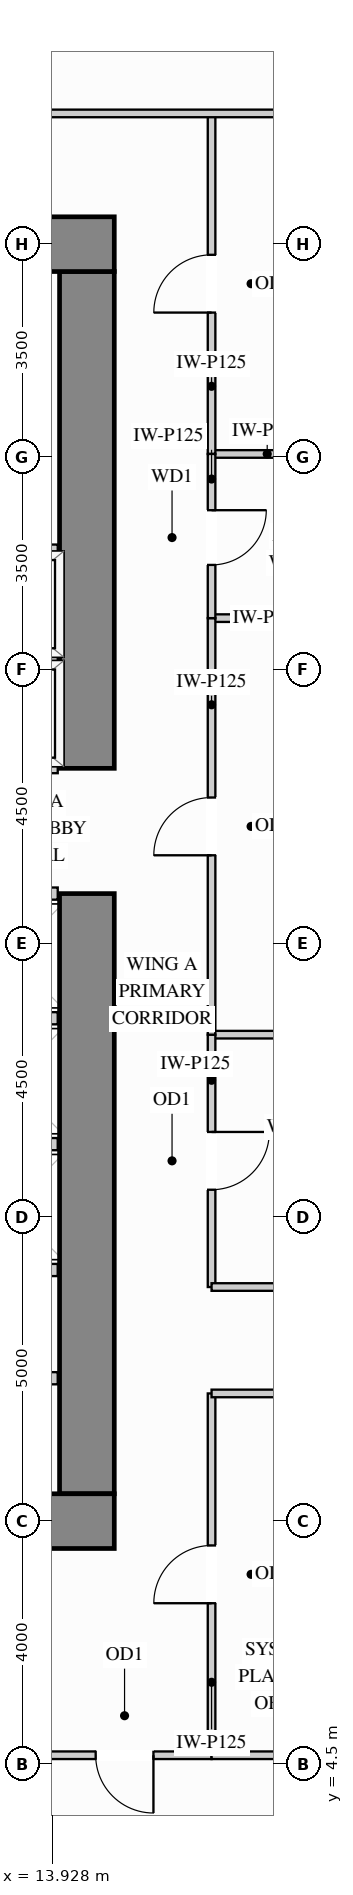
"""IFC4 building model, lengths in metres.
Left out: names, types, materials, properties, quantities, classifications, styles, units other than length and angle.
Written with IfcOpenShell. Run it as: python <this file> out.ifc"""

import sys

from ifc_helpers import new_model, si_unit, direction, frame, frame_2d, origin, place, context, subcontext, project, spatial, rectangle, extrude, source, transform, mapped, element, fill, save


model = new_model("IFC4")
c1 = context("Model", 3, precision=1e-05, world=origin(), true_north=direction((0.0, 1.0)))
c2 = subcontext(c1, "Body", "Model", "MODEL_VIEW")
j1 = project(units=[si_unit("LENGTHUNIT", "METRE"), si_unit("PLANEANGLEUNIT", "RADIAN")], contexts=[c1])
p1 = place(None, origin())
s1 = spatial("IfcSite", under=j1, at=p1, CompositionType="ELEMENT")
p2 = place(p1, origin())
s2 = spatial("IfcBuilding", under=s1, at=p2, CompositionType="ELEMENT")
p3 = place(p2, frame((0.0, 0.0, 44.1)))
s3 = spatial("IfcBuildingStorey", under=s2, at=p3, CompositionType="ELEMENT", Elevation=44.1)
m1 = source(origin(), c2, "Body", "SweptSolid", [
    extrude(rectangle(XDim=9.87, YDim=0.9, at=frame_2d((4.935, 0.0))), origin(), (0.0, 0.0, 1.0), 3.38),
])
p4 = place(p3, frame((14.5, 8.95, 0.0), z_axis=(0.0, 0.0, 1.0), x_axis=(0.0, 1.0, 0.0)))
e1 = element("IfcWall", 1, at=p4, inside=s3, PredefinedType="SHEAR", context=c2, shape_type="MappedRepresentation", body=[
    mapped(m1, transform((0.0, 0.0, 0.0), x_axis=(1.0, 0.0, 0.0), y_axis=(0.0, 1.0, 0.0), z_axis=(0.0, 0.0, 1.0))),
])
m2 = source(origin(), c2, "Body", "SweptSolid", [
    extrude(rectangle(XDim=8.17, YDim=0.9, at=frame_2d((4.085, 0.0))), origin(), (0.0, 0.0, 1.0), 3.38),
])
p5 = place(p3, frame((14.5, 20.88, 0.0), z_axis=(0.0, 0.0, 1.0), x_axis=(0.0, 1.0, 0.0)))
e2 = element("IfcWall", 2, at=p5, inside=s3, PredefinedType="SHEAR", context=c2, shape_type="MappedRepresentation", body=[
    mapped(m2, transform((0.0, 0.0, 0.0), x_axis=(1.0, 0.0, 0.0), y_axis=(0.0, 1.0, 0.0), z_axis=(0.0, 0.0, 1.0))),
])
m3 = source(origin(), c2, "Body", "SweptSolid", [
    extrude(rectangle(XDim=10.9, YDim=0.9, at=frame_2d((5.45, 0.0))), origin(), (0.0, 0.0, 1.0), 3.38),
])
for number, where, z_axis, x_axis in (
    (3, (4.05, 29.5, 0.0), (0.0, 0.0, 1.0), (1.0, 0.0, 0.0)),
    (4, (4.05, 8.5, 0.0), (0.0, 0.0, 1.0), (1.0, 0.0, 0.0)),
):
    element("IfcWall", number, at=place(p3, frame(where, z_axis=z_axis, x_axis=x_axis)), inside=s3, PredefinedType="SHEAR", context=c2, shape_type="MappedRepresentation", body=[
        mapped(m3, transform((0.0, 0.0, 0.0), x_axis=(1.0, 0.0, 0.0), y_axis=(0.0, 1.0, 0.0), z_axis=(0.0, 0.0, 1.0))),
    ])
m4 = source(origin(), c2, "Body", "SweptSolid", [
    extrude(rectangle(XDim=2.6, YDim=0.125, at=frame_2d((1.3, 0.0))), origin(), (0.0, 0.0, 1.0), 2.896),
])
p6 = place(p3, frame((16.55, 16.5, 0.0), z_axis=(0.0, 0.0, 1.0), x_axis=(1.0, 0.0, 0.0)))
e5 = element("IfcWall", 5, at=p6, inside=s3, PredefinedType="PARTITIONING", context=c2, shape_type="MappedRepresentation", body=[
    mapped(m4, transform((0.0, 0.0, 0.0), x_axis=(1.0, 0.0, 0.0), y_axis=(0.0, 1.0, 0.0), z_axis=(0.0, 0.0, 1.0))),
])
m5 = source(origin(), c2, "Body", "SweptSolid", [
    extrude(rectangle(XDim=2.598, YDim=0.125, at=frame_2d((1.299, 0.0))), origin(), (0.0, 0.0, 1.0), 3.365),
])
for number, where, z_axis, x_axis in (
    (6, (16.55, 23.35, 0.0), (0.0, 0.0, 1.0), (1.0, 0.0, 0.0)),
    (7, (16.55, 26.05, 0.0), (0.0, 0.0, 1.0), (1.0, 0.0, 0.0)),
):
    element("IfcWall", number, at=place(p3, frame(where, z_axis=z_axis, x_axis=x_axis)), inside=s3, PredefinedType="PARTITIONING", context=c2, shape_type="MappedRepresentation", body=[
        mapped(m5, transform((0.0, 0.0, 0.0), x_axis=(1.0, 0.0, 0.0), y_axis=(0.0, 1.0, 0.0), z_axis=(0.0, 0.0, 1.0))),
    ])
p7 = place(p3, frame((16.55, 12.35, 0.0), z_axis=(0.0, 0.0, 1.0), x_axis=(0.0, 1.0, 0.0)))
e8 = element("IfcWall", 8, at=p7, inside=s3, PredefinedType="PARTITIONING", context=c2, shape_type="SweptSolid", body=[
    extrude(rectangle(XDim=4.15, YDim=0.125, at=frame_2d((2.075, 0.0))), origin(), (0.0, 0.0, 1.0), 3.365),
])
p8 = place(p7, frame((1.6, 0.0, 0.0)))
e9 = element("IfcOpeningElement", 9, at=p8, cuts=e8, PredefinedType="OPENING", context=c2, shape_type="SweptSolid", body=[
    extrude(rectangle(XDim=0.95, YDim=2.15, at=frame_2d((0.475, 1.075))), frame((0.0, 0.073, 0.0), z_axis=(0.0, -1.0, 0.0), x_axis=(1.0, 0.0, 0.0)), (0.0, 0.0, 1.0), 0.145),
])
p9 = place(p3, frame((16.55, 16.5, 0.0), z_axis=(0.0, 0.0, 1.0), x_axis=(0.0, 1.0, 0.0)))
e10 = element("IfcWall", 10, at=p9, inside=s3, PredefinedType="PARTITIONING", context=c2, shape_type="SweptSolid", body=[
    extrude(rectangle(XDim=6.85, YDim=0.125, at=frame_2d((3.425, 0.0))), origin(), (0.0, 0.0, 1.0), 3.365),
])
p10 = place(p9, frame((2.95, 0.0, 0.0)))
e11 = element("IfcOpeningElement", 11, at=p10, cuts=e10, PredefinedType="OPENING", context=c2, shape_type="SweptSolid", body=[
    extrude(rectangle(XDim=0.95, YDim=2.15, at=frame_2d((0.475, 1.075))), frame((0.0, 0.073, 0.0), z_axis=(0.0, -1.0, 0.0), x_axis=(1.0, 0.0, 0.0)), (0.0, 0.0, 1.0), 0.145),
])
p11 = place(p3, frame((16.55, 26.05, 0.0), z_axis=(0.0, 0.0, 1.0), x_axis=(0.0, 1.0, 0.0)))
e12 = element("IfcWall", 12, at=p11, inside=s3, PredefinedType="PARTITIONING", context=c2, shape_type="SweptSolid", body=[
    extrude(rectangle(XDim=5.6, YDim=0.125, at=frame_2d((2.8, 0.0))), origin(), (0.0, 0.0, 1.0), 3.365),
])
p12 = place(p11, frame((2.325, 0.0, 0.0)))
e13 = element("IfcOpeningElement", 13, at=p12, cuts=e12, PredefinedType="OPENING", context=c2, shape_type="SweptSolid", body=[
    extrude(rectangle(XDim=0.95, YDim=2.15, at=frame_2d((0.475, 1.075))), frame((0.0, 0.073, 0.0), z_axis=(0.0, -1.0, 0.0), x_axis=(1.0, 0.0, 0.0)), (0.0, 0.0, 1.0), 0.145),
])
p13 = place(p3, frame((16.55, 4.65, 0.0), z_axis=(0.0, 0.0, 1.0), x_axis=(0.0, 1.0, 0.0)))
e14 = element("IfcWall", 14, at=p13, inside=s3, PredefinedType="PARTITIONING", context=c2, shape_type="SweptSolid", body=[
    extrude(rectangle(XDim=5.95, YDim=0.125, at=frame_2d((2.975, 0.0))), origin(), (0.0, 0.0, 1.0), 3.365),
])
p14 = place(p13, frame((2.5, 0.0, 0.0)))
e15 = element("IfcOpeningElement", 15, at=p14, cuts=e14, PredefinedType="OPENING", context=c2, shape_type="SweptSolid", body=[
    extrude(rectangle(XDim=0.95, YDim=2.15, at=frame_2d((0.475, 1.075))), frame((0.0, 0.073, 0.0), z_axis=(0.0, -1.0, 0.0), x_axis=(1.0, 0.0, 0.0)), (0.0, 0.0, 1.0), 0.145),
])
p15 = place(p3, frame((16.55, 23.35, 0.0), z_axis=(0.0, 0.0, 1.0), x_axis=(0.0, 1.0, 0.0)))
e16 = element("IfcWall", 16, at=p15, inside=s3, PredefinedType="PARTITIONING", context=c2, shape_type="SweptSolid", body=[
    extrude(rectangle(XDim=2.7, YDim=0.125, at=frame_2d((1.35, 0.0))), origin(), (0.0, 0.0, 1.0), 3.365),
])
p16 = place(p15, frame((0.875, 0.0, 0.0)))
e17 = element("IfcOpeningElement", 17, at=p16, cuts=e16, PredefinedType="OPENING", context=c2, shape_type="SweptSolid", body=[
    extrude(rectangle(XDim=0.9, YDim=2.15, at=frame_2d((0.45, 1.075))), frame((0.0, 0.073, 0.0), z_axis=(0.0, -1.0, 0.0), x_axis=(1.0, 0.0, 0.0)), (0.0, 0.0, 1.0), 0.145),
])
m6 = source(origin(), c2, "Body", "SweptSolid", [
    extrude(rectangle(XDim=12.598, YDim=0.125, at=frame_2d((6.299, 0.0))), origin(), (0.0, 0.0, 1.0), 2.828),
])
p17 = place(p3, frame((6.55, 31.65, 0.0), z_axis=(0.0, 0.0, 1.0), x_axis=(1.0, 0.0, 0.0)))
e18 = element("IfcWall", 18, at=p17, inside=s3, PredefinedType="PARTITIONING", context=c2, shape_type="MappedRepresentation", body=[
    mapped(m6, transform((0.0, 0.0, 0.0), x_axis=(1.0, 0.0, 0.0), y_axis=(0.0, 1.0, 0.0), z_axis=(0.0, 0.0, 1.0))),
])
m7 = source(origin(), c2, "Body", "SweptSolid", [
    extrude(rectangle(XDim=2.95, YDim=0.125, at=frame_2d((1.475, 0.0))), origin(), (0.0, 0.0, 1.0), 3.365),
])
for number, where, z_axis, x_axis in (
    (19, (16.55, 12.35, 0.0), (0.0, 0.0, 1.0), (1.0, 0.0, 0.0)),
    (20, (16.55, 10.6, 0.0), (0.0, 0.0, 1.0), (1.0, 0.0, 0.0)),
):
    element("IfcWall", number, at=place(p3, frame(where, z_axis=z_axis, x_axis=x_axis)), inside=s3, PredefinedType="PARTITIONING", context=c2, shape_type="MappedRepresentation", body=[
        mapped(m7, transform((0.0, 0.0, 0.0), x_axis=(1.0, 0.0, 0.0), y_axis=(0.0, 1.0, 0.0), z_axis=(0.0, 0.0, 1.0))),
    ])
p18 = place(p3, frame((13.688, 4.65, 0.0), z_axis=(0.0, 0.0, 1.0), x_axis=(1.0, 0.0, 0.0)))
e21 = element("IfcWall", 21, at=p18, inside=s3, PredefinedType="PARTITIONING", context=c2, shape_type="SweptSolid", body=[
    extrude(rectangle(XDim=2.862, YDim=0.125, at=frame_2d((1.431, 0.0))), origin(), (0.0, 0.0, 1.0), 2.828),
])
p19 = place(p18, frame((0.956, 0.0, 0.0)))
e22 = element("IfcOpeningElement", 22, at=p19, cuts=e21, PredefinedType="OPENING", context=c2, shape_type="SweptSolid", body=[
    extrude(rectangle(XDim=0.95, YDim=2.15, at=frame_2d((0.475, 1.075))), frame((0.0, 0.073, 0.0), z_axis=(0.0, -1.0, 0.0), x_axis=(1.0, 0.0, 0.0)), (0.0, 0.0, 1.0), 0.145),
])
m8 = source(origin(), c2, "Body", "SweptSolid", [
    extrude(rectangle(XDim=2.598, YDim=0.125, at=frame_2d((1.299, 0.0))), origin(), (0.0, 0.0, 1.0), 2.828),
])
p20 = place(p3, frame((16.55, 4.65, 0.0), z_axis=(0.0, 0.0, 1.0), x_axis=(1.0, 0.0, 0.0)))
e23 = element("IfcWall", 23, at=p20, inside=s3, PredefinedType="PARTITIONING", context=c2, shape_type="MappedRepresentation", body=[
    mapped(m8, transform((0.0, 0.0, 0.0), x_axis=(1.0, 0.0, 0.0), y_axis=(0.0, 1.0, 0.0), z_axis=(0.0, 0.0, 1.0))),
])
m9 = source(origin(), c2, "Body", "SweptSolid", [
    extrude(rectangle(XDim=1.6, YDim=0.2, at=frame_2d((0.8, 0.0))), origin(), (0.0, 0.0, 1.0), 3.365),
])
p21 = place(p3, frame((12.42, 10.85, 0.0), z_axis=(0.0, 0.0, 1.0), x_axis=(1.0, 0.0, 0.0)))
e24 = element("IfcWall", 24, at=p21, inside=s3, PredefinedType="PARTITIONING", context=c2, shape_type="MappedRepresentation", body=[
    mapped(m9, transform((0.0, 0.0, 0.0), x_axis=(1.0, 0.0, 0.0), y_axis=(0.0, 1.0, 0.0), z_axis=(0.0, 0.0, 1.0))),
])
m10 = source(origin(), c2, "Body", "SweptSolid", [
    extrude(rectangle(XDim=2.19, YDim=0.2, at=frame_2d((1.095, 0.0))), origin(), (0.0, 0.0, 1.0), 3.365),
])
for number, where, z_axis, x_axis in (
    (25, (11.83, 22.66, 0.0), (0.0, 0.0, 1.0), (1.0, 0.0, 0.0)),
    (26, (11.83, 20.9, 0.0), (0.0, 0.0, 1.0), (1.0, 0.0, 0.0)),
    (27, (11.83, 24.46, 0.0), (0.0, 0.0, 1.0), (1.0, 0.0, 0.0)),
):
    element("IfcWall", number, at=place(p3, frame(where, z_axis=z_axis, x_axis=x_axis)), inside=s3, PredefinedType="PARTITIONING", context=c2, shape_type="MappedRepresentation", body=[
        mapped(m10, transform((0.0, 0.0, 0.0), x_axis=(1.0, 0.0, 0.0), y_axis=(0.0, 1.0, 0.0), z_axis=(0.0, 0.0, 1.0))),
    ])
m11 = source(origin(), c2, "Body", "SweptSolid", [
    extrude(rectangle(XDim=1.79, YDim=0.2, at=frame_2d((0.895, 0.0))), origin(), (0.0, 0.0, 1.0), 3.365),
])
for number, where, z_axis, x_axis in (
    (28, (12.23, 14.7, 0.0), (0.0, 0.0, 1.0), (1.0, 0.0, 0.0)),
    (29, (12.23, 12.63, 0.0), (0.0, 0.0, 1.0), (1.0, 0.0, 0.0)),
    (30, (12.23, 16.77, 0.0), (0.0, 0.0, 1.0), (1.0, 0.0, 0.0)),
    (31, (12.23, 18.82, 0.0), (0.0, 0.0, 1.0), (1.0, 0.0, 0.0)),
):
    element("IfcWall", number, at=place(p3, frame(where, z_axis=z_axis, x_axis=x_axis)), inside=s3, PredefinedType="PARTITIONING", context=c2, shape_type="MappedRepresentation", body=[
        mapped(m11, transform((0.0, 0.0, 0.0), x_axis=(1.0, 0.0, 0.0), y_axis=(0.0, 1.0, 0.0), z_axis=(0.0, 0.0, 1.0))),
    ])
m12 = source(origin(), c2, "Body", "SweptSolid", [
    extrude(rectangle(XDim=0.95, YDim=2.15, at=frame_2d((0.475, 1.075))), frame((0.0, 0.025, 0.0), z_axis=(0.0, -1.0, 0.0), x_axis=(1.0, 0.0, 0.0)), (0.0, 0.0, 1.0), 0.05),
])
p22 = place(p14, origin())
e32 = element("IfcDoor", 32, at=p22, inside=s3, OperationType="SINGLE_SWING_LEFT", PredefinedType="DOOR", context=c2, shape_type="MappedRepresentation", body=[
    mapped(m12, transform((0.0, 0.0, 0.0), x_axis=(1.0, 0.0, 0.0), y_axis=(0.0, 1.0, 0.0), z_axis=(0.0, 0.0, 1.0))),
])
fill(e15, e32)
p23 = place(p8, origin())
e33 = element("IfcDoor", 33, at=p23, inside=s3, OperationType="SINGLE_SWING_RIGHT", PredefinedType="DOOR", context=c2, shape_type="MappedRepresentation", body=[
    mapped(m12, transform((0.0, 0.0, 0.0), x_axis=(1.0, 0.0, 0.0), y_axis=(0.0, 1.0, 0.0), z_axis=(0.0, 0.0, 1.0))),
])
fill(e9, e33)
p24 = place(p10, origin())
e34 = element("IfcDoor", 34, at=p24, inside=s3, OperationType="SINGLE_SWING_LEFT", PredefinedType="DOOR", context=c2, shape_type="MappedRepresentation", body=[
    mapped(m12, transform((0.0, 0.0, 0.0), x_axis=(1.0, 0.0, 0.0), y_axis=(0.0, 1.0, 0.0), z_axis=(0.0, 0.0, 1.0))),
])
fill(e11, e34)
p25 = place(p12, origin())
e35 = element("IfcDoor", 35, at=p25, inside=s3, OperationType="SINGLE_SWING_LEFT", PredefinedType="DOOR", context=c2, shape_type="MappedRepresentation", body=[
    mapped(m12, transform((0.0, 0.0, 0.0), x_axis=(1.0, 0.0, 0.0), y_axis=(0.0, 1.0, 0.0), z_axis=(0.0, 0.0, 1.0))),
])
fill(e13, e35)
p26 = place(p19, origin())
e36 = element("IfcDoor", 36, at=p26, inside=s3, OperationType="SINGLE_SWING_RIGHT", PredefinedType="DOOR", context=c2, shape_type="MappedRepresentation", body=[
    mapped(m12, transform((0.0, 0.0, 0.0), x_axis=(1.0, 0.0, 0.0), y_axis=(0.0, 1.0, 0.0), z_axis=(0.0, 0.0, 1.0))),
])
fill(e22, e36)
m13 = source(origin(), c2, "Body", "SweptSolid", [
    extrude(rectangle(XDim=0.9, YDim=2.15, at=frame_2d((0.45, 1.075))), frame((0.0, 0.025, 0.0), z_axis=(0.0, -1.0, 0.0), x_axis=(1.0, 0.0, 0.0)), (0.0, 0.0, 1.0), 0.05),
])
p27 = place(p16, origin())
e37 = element("IfcDoor", 37, at=p27, inside=s3, OperationType="SINGLE_SWING_RIGHT", PredefinedType="DOOR", context=c2, shape_type="MappedRepresentation", body=[
    mapped(m13, transform((0.0, 0.0, 0.0), x_axis=(1.0, 0.0, 0.0), y_axis=(0.0, 1.0, 0.0), z_axis=(0.0, 0.0, 1.0))),
])
fill(e17, e37)
save(model, sys.argv[1])
